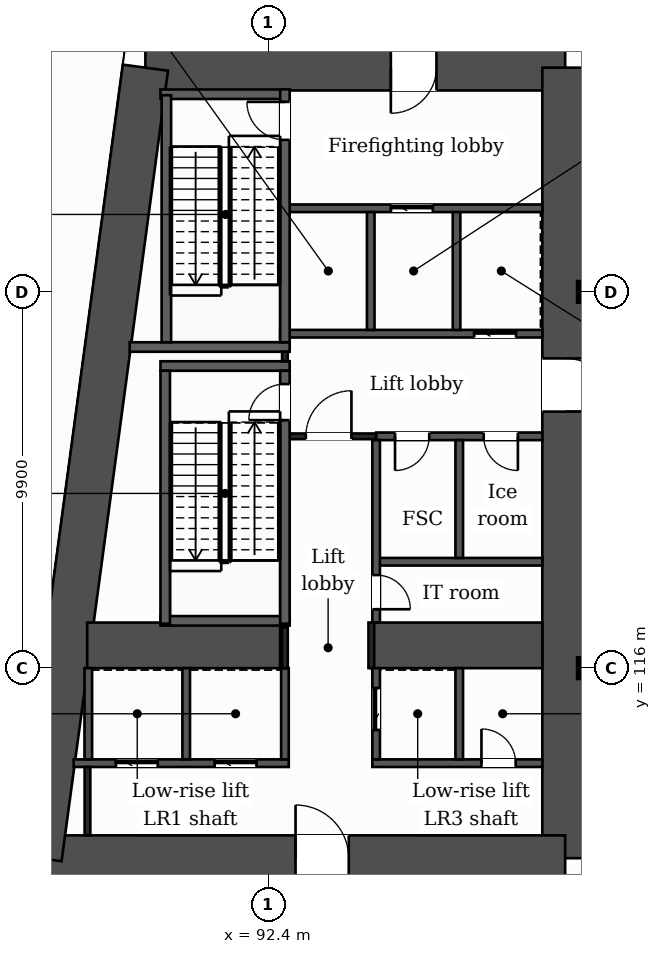
"""IFC4 building model, lengths in metres.
Left out: names, types, materials, properties, quantities, classifications, styles, units other than length and angle.
Written with IfcOpenShell. Run it as: python <this file> out.ifc"""

import sys

from ifc_helpers import new_model, si_unit, direction, frame, frame_2d, origin, place, context, subcontext, project, spatial, rectangle, extrude, element, fill, save


model = new_model("IFC4")
c1 = context("Model", 3, precision=1e-05, world=origin(), true_north=direction((0.0, 1.0)))
c2 = subcontext(c1, "Body", "Model", "MODEL_VIEW")
j1 = project(units=[si_unit("LENGTHUNIT", "METRE"), si_unit("PLANEANGLEUNIT", "RADIAN")], contexts=[c1])
p1 = place(None, origin())
s1 = spatial("IfcSite", under=j1, at=p1, CompositionType="ELEMENT")
p2 = place(p1, origin())
s2 = spatial("IfcBuilding", under=s1, at=p2, CompositionType="ELEMENT")
p3 = place(p2, frame((0.0, 0.0, 34.0)))
s3 = spatial("IfcBuildingStorey", under=s2, at=p3, CompositionType="ELEMENT", Elevation=34.0)
p4 = place(p3, frame((89.156, 131.8, 0.0), z_axis=(0.0, 0.0, 1.0), x_axis=(1.0, 0.0, 0.0)))
e1 = element("IfcWall", 1, at=p4, inside=s3, PredefinedType="SHEAR", context=c2, shape_type="SweptSolid", body=[
    extrude(rectangle(XDim=11.044, YDim=1.2, at=frame_2d((5.522, 0.0))), origin(), (0.0, 0.0, 1.0), 5.0),
])
p5 = place(p4, frame((6.458, 0.0, 0.0)))
e2 = element("IfcOpeningElement", 2, at=p5, cuts=e1, PredefinedType="OPENING", context=c2, shape_type="SweptSolid", body=[
    extrude(rectangle(XDim=1.2, YDim=2.1, at=frame_2d((0.6, 1.05))), frame((0.0, 0.61, 0.0), z_axis=(0.0, -1.0, 0.0), x_axis=(1.0, 0.0, 0.0)), (0.0, 0.0, 1.0), 1.22),
])
p6 = place(p3, frame((100.2, 131.8, 0.0), z_axis=(0.0, 0.0, 1.0), x_axis=(0.0, -1.0, 0.0)))
e3 = element("IfcWall", 3, at=p6, inside=s3, PredefinedType="SHEAR", context=c2, shape_type="SweptSolid", body=[
    extrude(rectangle(XDim=20.8, YDim=1.2, at=frame_2d((10.4, 0.0))), origin(), (0.0, 0.0, 1.0), 5.0),
])
p7 = place(p6, frame((7.65, 0.0, 0.0)))
e4 = element("IfcOpeningElement", 4, at=p7, cuts=e3, PredefinedType="OPENING", context=c2, shape_type="SweptSolid", body=[
    extrude(rectangle(XDim=1.4, YDim=2.1, at=frame_2d((0.7, 1.05))), frame((0.0, 0.61, 0.0), z_axis=(0.0, -1.0, 0.0), x_axis=(1.0, 0.0, 0.0)), (0.0, 0.0, 1.0), 1.22),
])
p8 = place(p3, frame((100.2, 111.0, 0.0), z_axis=(0.0, 0.0, 1.0), x_axis=(-1.0, 0.0, 0.0)))
e5 = element("IfcWall", 5, at=p8, inside=s3, PredefinedType="SHEAR", context=c2, shape_type="SweptSolid", body=[
    extrude(rectangle(XDim=13.844, YDim=1.2, at=frame_2d((6.922, 0.0))), origin(), (0.0, 0.0, 1.0), 5.0),
])
p9 = place(p8, frame((5.694, 0.0, 0.0)))
e6 = element("IfcOpeningElement", 6, at=p9, cuts=e5, PredefinedType="OPENING", context=c2, shape_type="SweptSolid", body=[
    extrude(rectangle(XDim=1.4, YDim=2.1, at=frame_2d((0.7, 1.05))), frame((0.0, 0.61, 0.0), z_axis=(0.0, -1.0, 0.0), x_axis=(1.0, 0.0, 0.0)), (0.0, 0.0, 1.0), 1.22),
])
p10 = place(p3, frame((86.355, 111.0, 0.0), z_axis=(0.0, 0.0, 1.0), x_axis=(0.133413989637, 0.99106039542, 0.0)))
e7 = element("IfcWall", 7, at=p10, inside=s3, PredefinedType="SHEAR", context=c2, shape_type="SweptSolid", body=[
    extrude(rectangle(XDim=20.988, YDim=1.2, at=frame_2d((10.494, 0.0))), origin(), (0.0, 0.0, 1.0), 5.0),
])
p11 = place(p3, frame((87.623, 116.6, 0.0), z_axis=(0.0, 0.0, 1.0), x_axis=(1.0, 0.0, 0.0)))
e8 = element("IfcWall", 8, at=p11, inside=s3, PredefinedType="SHEAR", context=c2, shape_type="SweptSolid", body=[
    extrude(rectangle(XDim=5.077, YDim=1.2, at=frame_2d((2.539, 0.0))), origin(), (0.0, 0.0, 1.0), 5.0),
])
p12 = place(p3, frame((95.1, 116.6, 0.0), z_axis=(0.0, 0.0, 1.0), x_axis=(1.0, 0.0, 0.0)))
e9 = element("IfcWall", 9, at=p12, inside=s3, PredefinedType="SHEAR", context=c2, shape_type="SweptSolid", body=[
    extrude(rectangle(XDim=4.5, YDim=1.2, at=frame_2d((2.25, 0.0))), origin(), (0.0, 0.0, 1.0), 5.0),
])
p13 = place(p3, frame((87.267, 113.5, 0.0), z_axis=(0.0, 0.0, 1.0), x_axis=(1.0, 0.0, 0.0)))
e10 = element("IfcWall", 10, at=p13, inside=s3, PredefinedType="PARTITIONING", context=c2, shape_type="SweptSolid", body=[
    extrude(rectangle(XDim=5.66, YDim=0.2, at=frame_2d((2.83, 0.0))), origin(), (0.0, 0.0, 1.0), 4.68),
])
p14 = place(p13, frame((1.113, 0.0, 0.0)))
e11 = element("IfcOpeningElement", 11, at=p14, cuts=e10, PredefinedType="OPENING", context=c2, shape_type="SweptSolid", body=[
    extrude(rectangle(XDim=1.1, YDim=2.1, at=frame_2d((0.55, 1.05))), frame((0.0, 0.11, 0.0), z_axis=(0.0, -1.0, 0.0), x_axis=(1.0, 0.0, 0.0)), (0.0, 0.0, 1.0), 0.22),
])
p15 = place(p13, frame((3.711, 0.0, 0.0)))
e12 = element("IfcOpeningElement", 12, at=p15, cuts=e10, PredefinedType="OPENING", context=c2, shape_type="SweptSolid", body=[
    extrude(rectangle(XDim=1.1, YDim=2.1, at=frame_2d((0.55, 1.05))), frame((0.0, 0.11, 0.0), z_axis=(0.0, -1.0, 0.0), x_axis=(1.0, 0.0, 0.0)), (0.0, 0.0, 1.0), 0.22),
])
p16 = place(p3, frame((95.127, 113.5, 0.0), z_axis=(0.0, 0.0, 1.0), x_axis=(1.0, 0.0, 0.0)))
e13 = element("IfcWall", 13, at=p16, inside=s3, PredefinedType="PARTITIONING", context=c2, shape_type="SweptSolid", body=[
    extrude(rectangle(XDim=4.473, YDim=0.2, at=frame_2d((2.237, 0.0))), origin(), (0.0, 0.0, 1.0), 4.68),
])
p17 = place(p16, frame((2.871, 0.0, 0.0)))
e14 = element("IfcOpeningElement", 14, at=p17, cuts=e13, PredefinedType="OPENING", context=c2, shape_type="SweptSolid", body=[
    extrude(rectangle(XDim=0.9, YDim=2.1, at=frame_2d((0.45, 1.05))), frame((0.0, 0.11, 0.0), z_axis=(0.0, -1.0, 0.0), x_axis=(1.0, 0.0, 0.0)), (0.0, 0.0, 1.0), 0.22),
])
p18 = place(p3, frame((89.552, 117.245, 0.0), z_axis=(0.0, 0.0, 1.0), x_axis=(1.0, 0.0, 0.0)))
e15 = element("IfcWall", 15, at=p18, inside=s3, PredefinedType="PARTITIONING", context=c2, shape_type="SweptSolid", body=[
    extrude(rectangle(XDim=3.4, YDim=0.25, at=frame_2d((1.7, 0.0))), origin(), (0.0, 0.0, 1.0), 4.68),
])
p19 = place(p3, frame((95.227, 118.8, 0.0), z_axis=(0.0, 0.0, 1.0), x_axis=(1.0, 0.0, 0.0)))
e16 = element("IfcWall", 16, at=p19, inside=s3, PredefinedType="PARTITIONING", context=c2, shape_type="SweptSolid", body=[
    extrude(rectangle(XDim=4.373, YDim=0.2, at=frame_2d((2.187, 0.0))), origin(), (0.0, 0.0, 1.0), 4.68),
])
p20 = place(p3, frame((95.227, 122.1, 0.0), z_axis=(0.0, 0.0, 1.0), x_axis=(1.0, 0.0, 0.0)))
e17 = element("IfcWall", 17, at=p20, inside=s3, PredefinedType="PARTITIONING", context=c2, shape_type="SweptSolid", body=[
    extrude(rectangle(XDim=4.373, YDim=0.2, at=frame_2d((2.187, 0.0))), origin(), (0.0, 0.0, 1.0), 4.68),
])
p21 = place(p20, frame((0.497, 0.0, 0.0)))
e18 = element("IfcOpeningElement", 18, at=p21, cuts=e17, PredefinedType="OPENING", context=c2, shape_type="SweptSolid", body=[
    extrude(rectangle(XDim=0.9, YDim=2.1, at=frame_2d((0.45, 1.05))), frame((0.0, 0.11, 0.0), z_axis=(0.0, -1.0, 0.0), x_axis=(1.0, 0.0, 0.0)), (0.0, 0.0, 1.0), 0.22),
])
p22 = place(p20, frame((2.83, 0.0, 0.0)))
e19 = element("IfcOpeningElement", 19, at=p22, cuts=e17, PredefinedType="OPENING", context=c2, shape_type="SweptSolid", body=[
    extrude(rectangle(XDim=0.9, YDim=2.1, at=frame_2d((0.45, 1.05))), frame((0.0, 0.11, 0.0), z_axis=(0.0, -1.0, 0.0), x_axis=(1.0, 0.0, 0.0)), (0.0, 0.0, 1.0), 0.22),
])
p23 = place(p3, frame((92.827, 122.1, 0.0), z_axis=(0.0, 0.0, 1.0), x_axis=(1.0, 0.0, 0.0)))
e20 = element("IfcWall", 20, at=p23, inside=s3, PredefinedType="PARTITIONING", context=c2, shape_type="SweptSolid", body=[
    extrude(rectangle(XDim=2.4, YDim=0.15, at=frame_2d((1.2, 0.0))), origin(), (0.0, 0.0, 1.0), 4.68),
])
p24 = place(p23, frame((0.55, 0.0, 0.0)))
e21 = element("IfcOpeningElement", 21, at=p24, cuts=e20, PredefinedType="OPENING", context=c2, shape_type="SweptSolid", body=[
    extrude(rectangle(XDim=1.2, YDim=2.1, at=frame_2d((0.6, 1.05))), frame((0.0, 0.085, 0.0), z_axis=(0.0, -1.0, 0.0), x_axis=(1.0, 0.0, 0.0)), (0.0, 0.0, 1.0), 0.17),
])
p25 = place(p3, frame((89.552, 123.95, 0.0), z_axis=(0.0, 0.0, 1.0), x_axis=(1.0, 0.0, 0.0)))
e22 = element("IfcWall", 22, at=p25, inside=s3, PredefinedType="PARTITIONING", context=c2, shape_type="SweptSolid", body=[
    extrude(rectangle(XDim=3.4, YDim=0.25, at=frame_2d((1.7, 0.0))), origin(), (0.0, 0.0, 1.0), 4.68),
])
p26 = place(p3, frame((88.741, 124.45, 0.0), z_axis=(0.0, 0.0, 1.0), x_axis=(1.0, 0.0, 0.0)))
e23 = element("IfcWall", 23, at=p26, inside=s3, PredefinedType="PARTITIONING", context=c2, shape_type="SweptSolid", body=[
    extrude(rectangle(XDim=4.21, YDim=0.25, at=frame_2d((2.105, 0.0))), origin(), (0.0, 0.0, 1.0), 4.68),
])
p27 = place(p3, frame((92.702, 124.8, 0.0), z_axis=(0.0, 0.0, 1.0), x_axis=(1.0, 0.0, 0.0)))
e24 = element("IfcWall", 24, at=p27, inside=s3, PredefinedType="PARTITIONING", context=c2, shape_type="SweptSolid", body=[
    extrude(rectangle(XDim=6.898, YDim=0.2, at=frame_2d((3.449, 0.0))), origin(), (0.0, 0.0, 1.0), 4.68),
])
p28 = place(p27, frame((5.105, 0.0, 0.0)))
e25 = element("IfcOpeningElement", 25, at=p28, cuts=e24, PredefinedType="OPENING", context=c2, shape_type="SweptSolid", body=[
    extrude(rectangle(XDim=1.1, YDim=2.1, at=frame_2d((0.55, 1.05))), frame((0.0, 0.11, 0.0), z_axis=(0.0, -1.0, 0.0), x_axis=(1.0, 0.0, 0.0)), (0.0, 0.0, 1.0), 0.22),
])
p29 = place(p3, frame((92.827, 128.1, 0.0), z_axis=(0.0, 0.0, 1.0), x_axis=(1.0, 0.0, 0.0)))
e26 = element("IfcWall", 26, at=p29, inside=s3, PredefinedType="PARTITIONING", context=c2, shape_type="SweptSolid", body=[
    extrude(rectangle(XDim=6.773, YDim=0.2, at=frame_2d((3.387, 0.0))), origin(), (0.0, 0.0, 1.0), 4.68),
])
p30 = place(p29, frame((2.791, 0.0, 0.0)))
e27 = element("IfcOpeningElement", 27, at=p30, cuts=e26, PredefinedType="OPENING", context=c2, shape_type="SweptSolid", body=[
    extrude(rectangle(XDim=1.1, YDim=2.1, at=frame_2d((0.55, 1.05))), frame((0.0, 0.11, 0.0), z_axis=(0.0, -1.0, 0.0), x_axis=(1.0, 0.0, 0.0)), (0.0, 0.0, 1.0), 0.22),
])
p31 = place(p3, frame((89.552, 131.101, 0.0), z_axis=(0.0, 0.0, 1.0), x_axis=(1.0, 0.0, 0.0)))
e28 = element("IfcWall", 28, at=p31, inside=s3, PredefinedType="PARTITIONING", context=c2, shape_type="SweptSolid", body=[
    extrude(rectangle(XDim=3.4, YDim=0.25, at=frame_2d((1.7, 0.0))), origin(), (0.0, 0.0, 1.0), 4.68),
])
p32 = place(p3, frame((87.653, 113.6, 0.0), z_axis=(0.0, 0.0, 1.0), x_axis=(0.0, 1.0, 0.0)))
e29 = element("IfcWall", 29, at=p32, inside=s3, PredefinedType="PARTITIONING", context=c2, shape_type="SweptSolid", body=[
    extrude(rectangle(XDim=2.4, YDim=0.2, at=frame_2d((1.2, 0.0))), origin(), (0.0, 0.0, 1.0), 4.68),
])
p33 = place(p3, frame((87.631, 111.6, 0.0), z_axis=(0.0, 0.0, 1.0), x_axis=(0.0, 1.0, 0.0)))
e30 = element("IfcWall", 30, at=p33, inside=s3, PredefinedType="PARTITIONING", context=c2, shape_type="SweptSolid", body=[
    extrude(rectangle(XDim=1.8, YDim=0.15, at=frame_2d((0.9, 0.0))), origin(), (0.0, 0.0, 1.0), 4.68),
])
p34 = place(p3, frame((89.677, 117.17, 0.0), z_axis=(0.0, 0.0, 1.0), x_axis=(0.0, 1.0, 0.0)))
e31 = element("IfcWall", 31, at=p34, inside=s3, PredefinedType="PARTITIONING", context=c2, shape_type="SweptSolid", body=[
    extrude(rectangle(XDim=6.655, YDim=0.25, at=frame_2d((3.328, 0.0))), origin(), (0.0, 0.0, 1.0), 4.68),
])
p35 = place(p3, frame((89.707, 124.575, 0.0), z_axis=(0.0, 0.0, 1.0), x_axis=(0.0, 1.0, 0.0)))
e32 = element("IfcWall", 32, at=p35, inside=s3, PredefinedType="PARTITIONING", context=c2, shape_type="SweptSolid", body=[
    extrude(rectangle(XDim=6.5, YDim=0.25, at=frame_2d((3.25, 0.0))), origin(), (0.0, 0.0, 1.0), 4.68),
])
for number, where, z_axis, x_axis in (
    (33, (90.229, 113.6, 0.0), (0.0, 0.0, 1.0), (0.0, 1.0, 0.0)),
    (34, (92.827, 113.6, 0.0), (0.0, 0.0, 1.0), (0.0, 1.0, 0.0)),
):
    element("IfcWall", number, at=place(p3, frame(where, z_axis=z_axis, x_axis=x_axis)), inside=s3, PredefinedType="PARTITIONING", context=c2, shape_type="SweptSolid", body=[
        extrude(rectangle(XDim=2.4, YDim=0.2, at=frame_2d((1.2, 0.0))), origin(), (0.0, 0.0, 1.0), 4.68),
    ])
p36 = place(p3, frame((92.827, 116.0, 0.0), z_axis=(0.0, 0.0, 1.0), x_axis=(0.0, 1.0, 0.0)))
e35 = element("IfcWall", 35, at=p36, inside=s3, PredefinedType="PARTITIONING", context=c2, shape_type="SweptSolid", body=[
    extrude(rectangle(XDim=1.075, YDim=0.15, at=frame_2d((0.538, 0.0))), origin(), (0.0, 0.0, 1.0), 4.68),
])
p37 = place(p3, frame((92.827, 124.075, 0.0), z_axis=(0.0, 0.0, 1.0), x_axis=(0.0, 1.0, 0.0)))
e36 = element("IfcWall", 36, at=p37, inside=s3, PredefinedType="PARTITIONING", context=c2, shape_type="SweptSolid", body=[
    extrude(rectangle(XDim=0.25, YDim=0.15, at=frame_2d((0.125, 0.0))), origin(), (0.0, 0.0, 1.0), 4.68),
])
p38 = place(p3, frame((92.827, 117.17, 0.0), z_axis=(0.0, 0.0, 1.0), x_axis=(0.0, 1.0, 0.0)))
e37 = element("IfcWall", 37, at=p38, inside=s3, PredefinedType="PARTITIONING", context=c2, shape_type="SweptSolid", body=[
    extrude(rectangle(XDim=6.655, YDim=0.25, at=frame_2d((3.328, 0.0))), origin(), (0.0, 0.0, 1.0), 4.68),
])
p39 = place(p38, frame((5.355, 0.0, 0.0)))
e38 = element("IfcOpeningElement", 38, at=p39, cuts=e37, PredefinedType="OPENING", context=c2, shape_type="SweptSolid", body=[
    extrude(rectangle(XDim=0.95, YDim=2.1, at=frame_2d((0.475, 1.05))), frame((0.0, 0.135, 0.0), z_axis=(0.0, -1.0, 0.0), x_axis=(1.0, 0.0, 0.0)), (0.0, 0.0, 1.0), 0.27),
])
p40 = place(p3, frame((92.827, 124.575, 0.0), z_axis=(0.0, 0.0, 1.0), x_axis=(0.0, 1.0, 0.0)))
e39 = element("IfcWall", 39, at=p40, inside=s3, PredefinedType="PARTITIONING", context=c2, shape_type="SweptSolid", body=[
    extrude(rectangle(XDim=6.655, YDim=0.25, at=frame_2d((3.328, 0.0))), origin(), (0.0, 0.0, 1.0), 4.68),
])
p41 = place(p40, frame((5.325, 0.0, 0.0)))
e40 = element("IfcOpeningElement", 40, at=p41, cuts=e39, PredefinedType="OPENING", context=c2, shape_type="SweptSolid", body=[
    extrude(rectangle(XDim=1.0, YDim=2.1, at=frame_2d((0.5, 1.05))), frame((0.0, 0.135, 0.0), z_axis=(0.0, -1.0, 0.0), x_axis=(1.0, 0.0, 0.0)), (0.0, 0.0, 1.0), 0.27),
])
p42 = place(p3, frame((95.085, 124.9, 0.0), z_axis=(0.0, 0.0, 1.0), x_axis=(0.0, 1.0, 0.0)))
e41 = element("IfcWall", 41, at=p42, inside=s3, PredefinedType="PARTITIONING", context=c2, shape_type="SweptSolid", body=[
    extrude(rectangle(XDim=3.1, YDim=0.2, at=frame_2d((1.55, 0.0))), origin(), (0.0, 0.0, 1.0), 4.68),
])
p43 = place(p3, frame((95.1, 116.0, 0.0), z_axis=(0.0, 0.0, 1.0), x_axis=(0.0, 1.0, 0.0)))
e42 = element("IfcWall", 42, at=p43, inside=s3, PredefinedType="PARTITIONING", context=c2, shape_type="SweptSolid", body=[
    extrude(rectangle(XDim=1.2, YDim=0.15, at=frame_2d((0.6, 0.0))), origin(), (0.0, 0.0, 1.0), 4.68),
])
p44 = place(p3, frame((95.227, 113.6, 0.0), z_axis=(0.0, 0.0, 1.0), x_axis=(0.0, 1.0, 0.0)))
e43 = element("IfcWall", 43, at=p44, inside=s3, PredefinedType="PARTITIONING", context=c2, shape_type="SweptSolid", body=[
    extrude(rectangle(XDim=2.4, YDim=0.2, at=frame_2d((1.2, 0.0))), origin(), (0.0, 0.0, 1.0), 4.68),
])
p45 = place(p44, frame((0.775, 0.0, 0.0)))
e44 = element("IfcOpeningElement", 44, at=p45, cuts=e43, PredefinedType="OPENING", context=c2, shape_type="SweptSolid", body=[
    extrude(rectangle(XDim=1.1, YDim=2.1, at=frame_2d((0.55, 1.05))), frame((0.0, 0.11, 0.0), z_axis=(0.0, -1.0, 0.0), x_axis=(1.0, 0.0, 0.0)), (0.0, 0.0, 1.0), 0.22),
])
p46 = place(p3, frame((95.227, 117.2, 0.0), z_axis=(0.0, 0.0, 1.0), x_axis=(0.0, 1.0, 0.0)))
e45 = element("IfcWall", 45, at=p46, inside=s3, PredefinedType="PARTITIONING", context=c2, shape_type="SweptSolid", body=[
    extrude(rectangle(XDim=4.8, YDim=0.2, at=frame_2d((2.4, 0.0))), origin(), (0.0, 0.0, 1.0), 4.68),
])
p47 = place(p46, frame((0.35, 0.0, 0.0)))
e46 = element("IfcOpeningElement", 46, at=p47, cuts=e45, PredefinedType="OPENING", context=c2, shape_type="SweptSolid", body=[
    extrude(rectangle(XDim=0.9, YDim=2.1, at=frame_2d((0.45, 1.05))), frame((0.0, 0.11, 0.0), z_axis=(0.0, -1.0, 0.0), x_axis=(1.0, 0.0, 0.0)), (0.0, 0.0, 1.0), 0.22),
])
p48 = place(p3, frame((97.342, 124.9, 0.0), z_axis=(0.0, 0.0, 1.0), x_axis=(0.0, 1.0, 0.0)))
e47 = element("IfcWall", 47, at=p48, inside=s3, PredefinedType="PARTITIONING", context=c2, shape_type="SweptSolid", body=[
    extrude(rectangle(XDim=3.1, YDim=0.2, at=frame_2d((1.55, 0.0))), origin(), (0.0, 0.0, 1.0), 4.68),
])
p49 = place(p3, frame((97.414, 113.6, 0.0), z_axis=(0.0, 0.0, 1.0), x_axis=(0.0, 1.0, 0.0)))
e48 = element("IfcWall", 48, at=p49, inside=s3, PredefinedType="PARTITIONING", context=c2, shape_type="SweptSolid", body=[
    extrude(rectangle(XDim=2.4, YDim=0.2, at=frame_2d((1.2, 0.0))), origin(), (0.0, 0.0, 1.0), 4.68),
])
p50 = place(p3, frame((97.414, 118.9, 0.0), z_axis=(0.0, 0.0, 1.0), x_axis=(0.0, 1.0, 0.0)))
e49 = element("IfcWall", 49, at=p50, inside=s3, PredefinedType="PARTITIONING", context=c2, shape_type="SweptSolid", body=[
    extrude(rectangle(XDim=3.1, YDim=0.2, at=frame_2d((1.55, 0.0))), origin(), (0.0, 0.0, 1.0), 4.68),
])
p51 = place(p24, origin())
e50 = element("IfcDoor", 50, at=p51, inside=s3, OperationType="SINGLE_SWING_RIGHT", PredefinedType="DOOR", context=c2, shape_type="SweptSolid", body=[
    extrude(rectangle(XDim=1.2, YDim=2.1, at=frame_2d((0.6, 1.05))), frame((0.0, 0.025, 0.0), z_axis=(0.0, -1.0, 0.0), x_axis=(1.0, 0.0, 0.0)), (0.0, 0.0, 1.0), 0.05),
])
fill(e21, e50)
p52 = place(p30, origin())
e51 = element("IfcDoor", 51, at=p52, inside=s3, OperationType="SLIDING_TO_LEFT", PredefinedType="DOOR", context=c2, shape_type="SweptSolid", body=[
    extrude(rectangle(XDim=1.1, YDim=2.1, at=frame_2d((0.55, 1.05))), frame((0.0, 0.025, 0.0), z_axis=(0.0, -1.0, 0.0), x_axis=(1.0, 0.0, 0.0)), (0.0, 0.0, 1.0), 0.05),
])
fill(e27, e51)
p53 = place(p28, origin())
e52 = element("IfcDoor", 52, at=p53, inside=s3, OperationType="SLIDING_TO_LEFT", PredefinedType="DOOR", context=c2, shape_type="SweptSolid", body=[
    extrude(rectangle(XDim=1.1, YDim=2.1, at=frame_2d((0.55, 1.05))), frame((0.0, 0.025, 0.0), z_axis=(0.0, -1.0, 0.0), x_axis=(1.0, 0.0, 0.0)), (0.0, 0.0, 1.0), 0.05),
])
fill(e25, e52)
p54 = place(p21, origin())
e53 = element("IfcDoor", 53, at=p54, inside=s3, OperationType="SINGLE_SWING_LEFT", PredefinedType="DOOR", context=c2, shape_type="SweptSolid", body=[
    extrude(rectangle(XDim=0.9, YDim=2.1, at=frame_2d((0.45, 1.05))), frame((0.0, 0.025, 0.0), z_axis=(0.0, -1.0, 0.0), x_axis=(1.0, 0.0, 0.0)), (0.0, 0.0, 1.0), 0.05),
])
fill(e18, e53)
p55 = place(p22, origin())
e54 = element("IfcDoor", 54, at=p55, inside=s3, OperationType="SINGLE_SWING_RIGHT", PredefinedType="DOOR", context=c2, shape_type="SweptSolid", body=[
    extrude(rectangle(XDim=0.9, YDim=2.1, at=frame_2d((0.45, 1.05))), frame((0.0, 0.025, 0.0), z_axis=(0.0, -1.0, 0.0), x_axis=(1.0, 0.0, 0.0)), (0.0, 0.0, 1.0), 0.05),
])
fill(e19, e54)
p56 = place(p39, origin())
e55 = element("IfcDoor", 55, at=p56, inside=s3, OperationType="SINGLE_SWING_LEFT", PredefinedType="DOOR", context=c2, shape_type="SweptSolid", body=[
    extrude(rectangle(XDim=0.95, YDim=2.1, at=frame_2d((0.475, 1.05))), frame((0.0, 0.025, 0.0), z_axis=(0.0, -1.0, 0.0), x_axis=(1.0, 0.0, 0.0)), (0.0, 0.0, 1.0), 0.05),
])
fill(e38, e55)
p57 = place(p41, origin())
e56 = element("IfcDoor", 56, at=p57, inside=s3, OperationType="SINGLE_SWING_RIGHT", PredefinedType="DOOR", context=c2, shape_type="SweptSolid", body=[
    extrude(rectangle(XDim=1.0, YDim=2.1, at=frame_2d((0.5, 1.05))), frame((0.0, 0.025, 0.0), z_axis=(0.0, -1.0, 0.0), x_axis=(1.0, 0.0, 0.0)), (0.0, 0.0, 1.0), 0.05),
])
fill(e40, e56)
p58 = place(p47, origin())
e57 = element("IfcDoor", 57, at=p58, inside=s3, OperationType="SINGLE_SWING_LEFT", PredefinedType="DOOR", context=c2, shape_type="SweptSolid", body=[
    extrude(rectangle(XDim=0.9, YDim=2.1, at=frame_2d((0.45, 1.05))), frame((0.0, 0.025, 0.0), z_axis=(0.0, -1.0, 0.0), x_axis=(1.0, 0.0, 0.0)), (0.0, 0.0, 1.0), 0.05),
])
fill(e46, e57)
p59 = place(p14, origin())
e58 = element("IfcDoor", 58, at=p59, inside=s3, OperationType="SLIDING_TO_LEFT", PredefinedType="DOOR", context=c2, shape_type="SweptSolid", body=[
    extrude(rectangle(XDim=1.1, YDim=2.1, at=frame_2d((0.55, 1.05))), frame((0.0, 0.025, 0.0), z_axis=(0.0, -1.0, 0.0), x_axis=(1.0, 0.0, 0.0)), (0.0, 0.0, 1.0), 0.05),
])
fill(e11, e58)
p60 = place(p15, origin())
e59 = element("IfcDoor", 59, at=p60, inside=s3, OperationType="SLIDING_TO_LEFT", PredefinedType="DOOR", context=c2, shape_type="SweptSolid", body=[
    extrude(rectangle(XDim=1.1, YDim=2.1, at=frame_2d((0.55, 1.05))), frame((0.0, 0.025, 0.0), z_axis=(0.0, -1.0, 0.0), x_axis=(1.0, 0.0, 0.0)), (0.0, 0.0, 1.0), 0.05),
])
fill(e12, e59)
p61 = place(p45, origin())
e60 = element("IfcDoor", 60, at=p61, inside=s3, OperationType="SLIDING_TO_LEFT", PredefinedType="DOOR", context=c2, shape_type="SweptSolid", body=[
    extrude(rectangle(XDim=1.1, YDim=2.1, at=frame_2d((0.55, 1.05))), frame((0.0, 0.025, 0.0), z_axis=(0.0, -1.0, 0.0), x_axis=(1.0, 0.0, 0.0)), (0.0, 0.0, 1.0), 0.05),
])
fill(e44, e60)
p62 = place(p17, origin())
e61 = element("IfcDoor", 61, at=p62, inside=s3, OperationType="SINGLE_SWING_LEFT", PredefinedType="DOOR", context=c2, shape_type="SweptSolid", body=[
    extrude(rectangle(XDim=0.9, YDim=2.1, at=frame_2d((0.45, 1.05))), frame((0.0, 0.025, 0.0), z_axis=(0.0, -1.0, 0.0), x_axis=(1.0, 0.0, 0.0)), (0.0, 0.0, 1.0), 0.05),
])
fill(e14, e61)
p63 = place(p9, origin())
e62 = element("IfcDoor", 62, at=p63, inside=s3, OperationType="SINGLE_SWING_RIGHT", PredefinedType="DOOR", context=c2, shape_type="SweptSolid", body=[
    extrude(rectangle(XDim=1.4, YDim=2.1, at=frame_2d((0.7, 1.05))), frame((0.0, 0.025, 0.0), z_axis=(0.0, -1.0, 0.0), x_axis=(1.0, 0.0, 0.0)), (0.0, 0.0, 1.0), 0.05),
])
fill(e6, e62)
p64 = place(p5, origin())
e63 = element("IfcDoor", 63, at=p64, inside=s3, OperationType="SINGLE_SWING_LEFT", PredefinedType="DOOR", context=c2, shape_type="SweptSolid", body=[
    extrude(rectangle(XDim=1.2, YDim=2.1, at=frame_2d((0.6, 1.05))), frame((0.0, 0.025, 0.0), z_axis=(0.0, -1.0, 0.0), x_axis=(1.0, 0.0, 0.0)), (0.0, 0.0, 1.0), 0.05),
])
fill(e2, e63)
p65 = place(p7, origin())
e64 = element("IfcDoor", 64, at=p65, inside=s3, OperationType="SINGLE_SWING_RIGHT", PredefinedType="DOOR", context=c2, shape_type="SweptSolid", body=[
    extrude(rectangle(XDim=1.4, YDim=2.1, at=frame_2d((0.7, 1.05))), frame((0.0, 0.025, 0.0), z_axis=(0.0, -1.0, 0.0), x_axis=(1.0, 0.0, 0.0)), (0.0, 0.0, 1.0), 0.05),
])
fill(e4, e64)
save(model, sys.argv[1])
